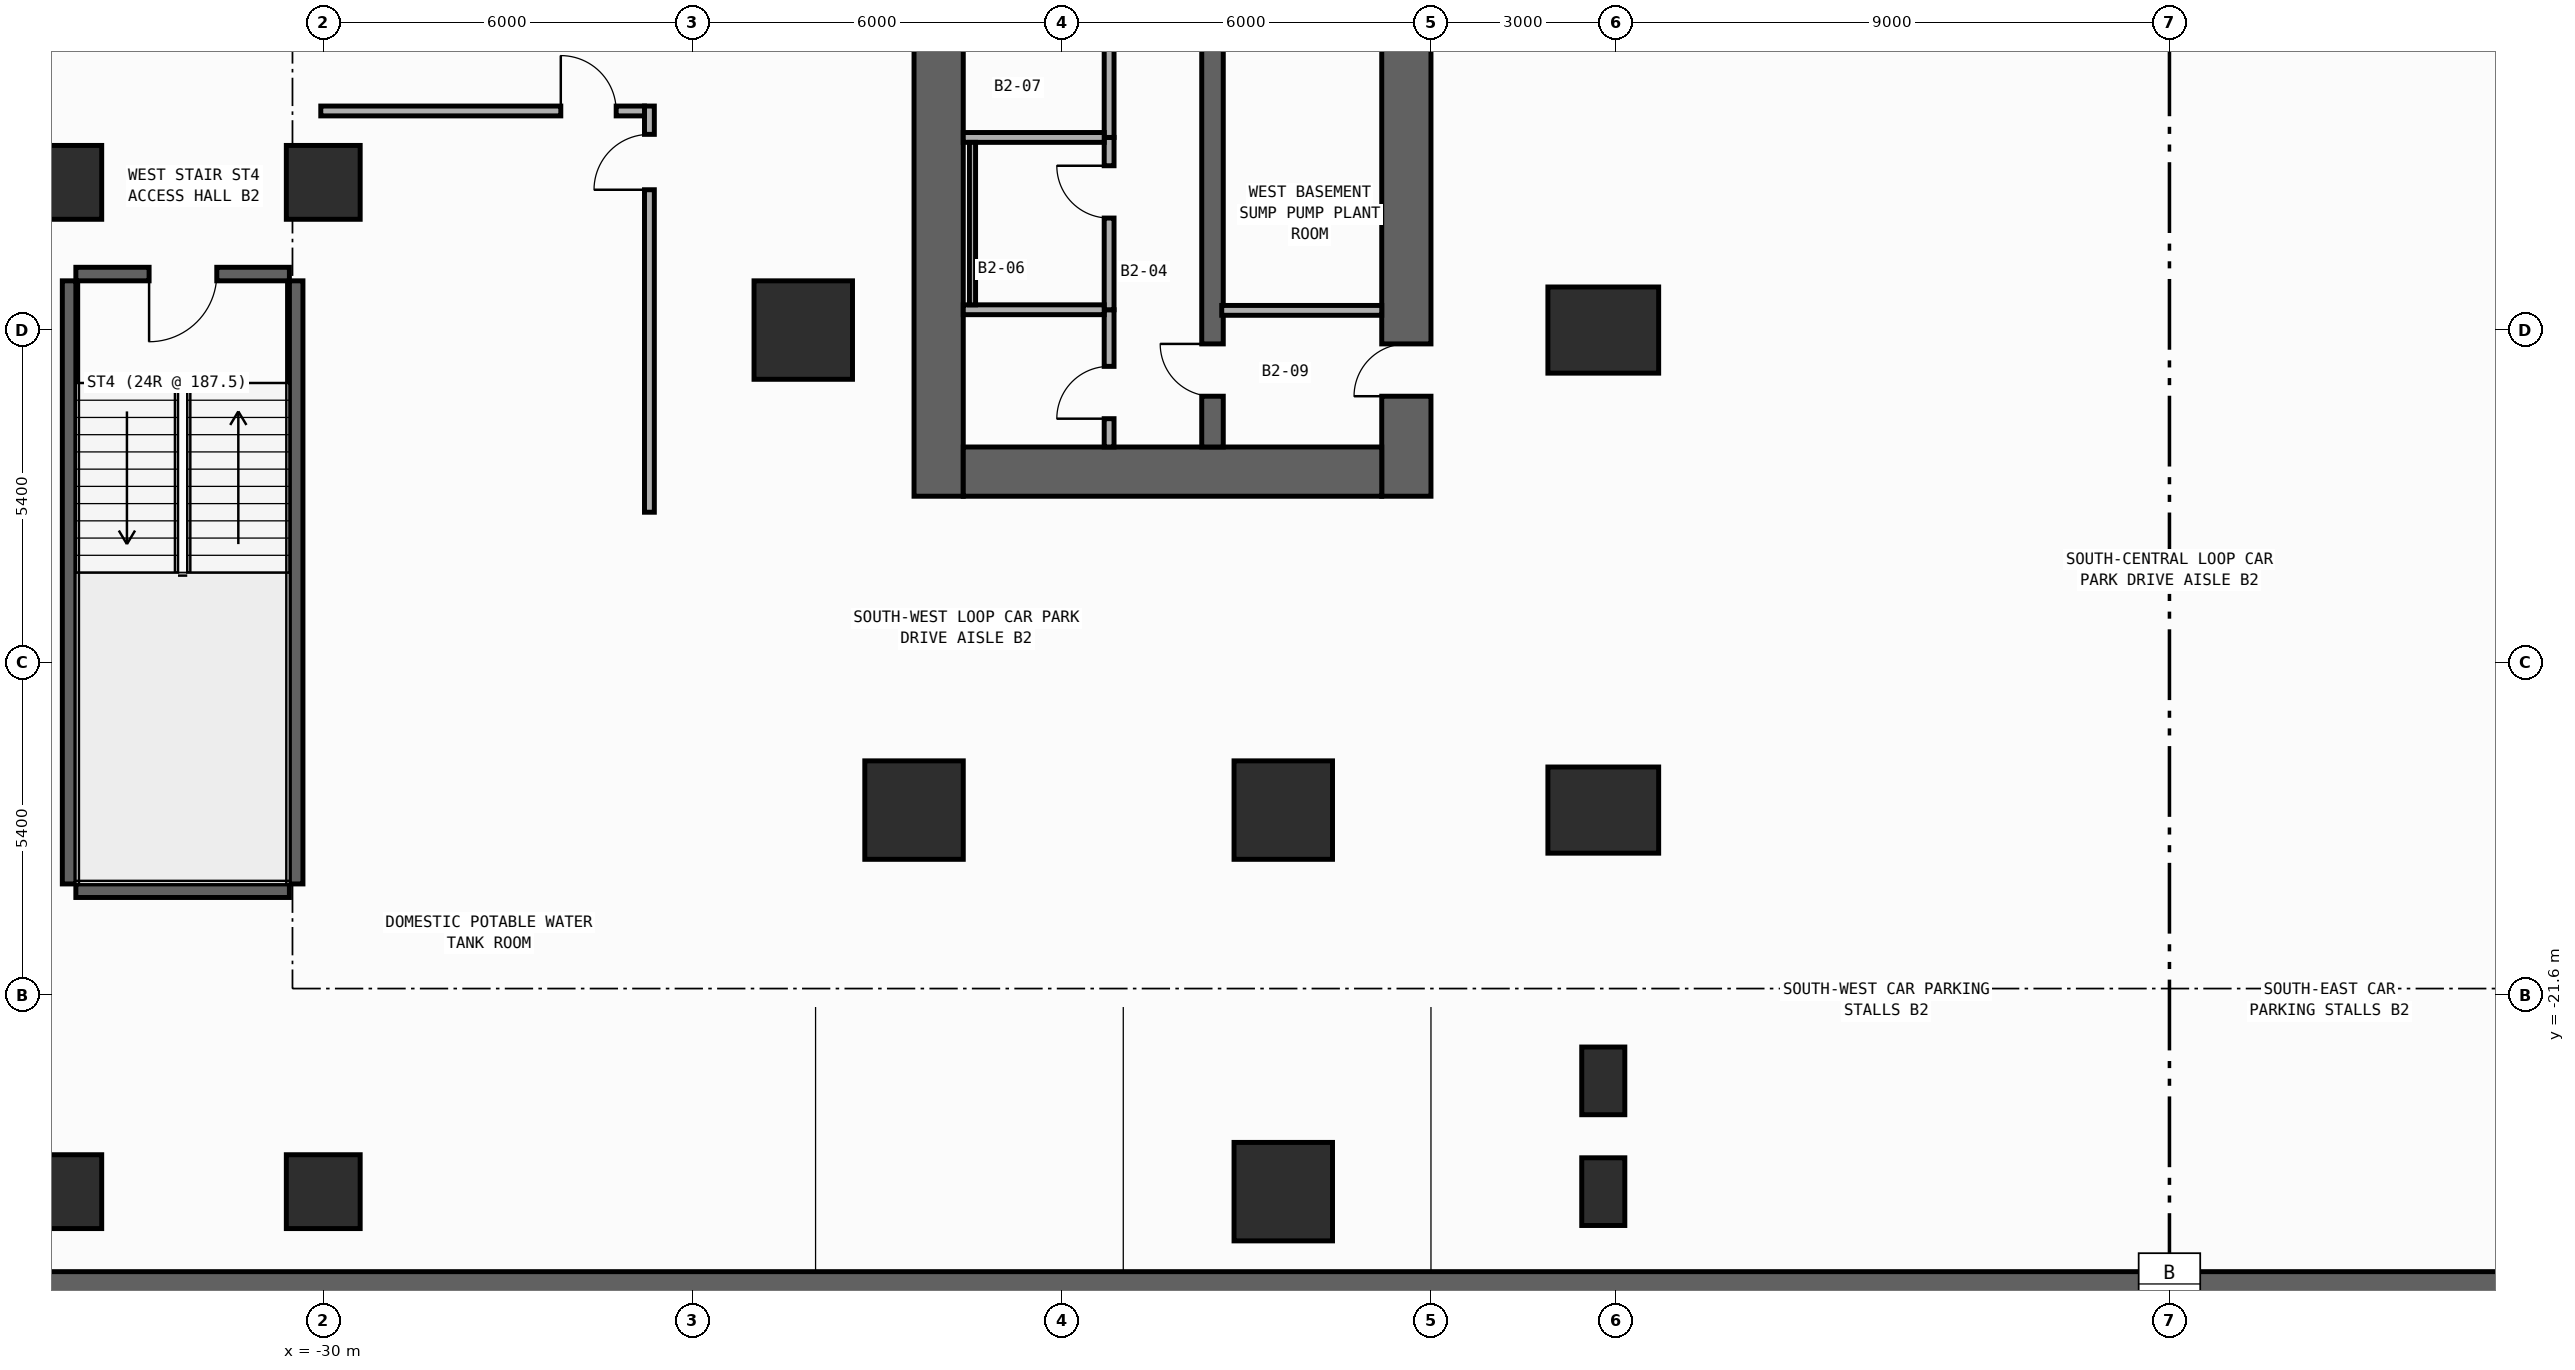
"""IFC4 building model, lengths in metres.
Left out: names, types, materials, properties, quantities, classifications, styles, units other than length and angle.
Written with IfcOpenShell. Run it as: python <this file> out.ifc"""

import sys

from ifc_helpers import new_model, si_unit, direction, frame, frame_2d, origin, origin_2d, place, context, subcontext, project, spatial, rectangle, extrude, element, fill, save


model = new_model("IFC4")
c1 = context("Model", 3, precision=1e-05, world=origin(), true_north=direction((0.0, 1.0)))
c2 = subcontext(c1, "Body", "Model", "MODEL_VIEW")
j1 = project(units=[si_unit("LENGTHUNIT", "METRE"), si_unit("PLANEANGLEUNIT", "RADIAN")], contexts=[c1])
p1 = place(None, origin())
s1 = spatial("IfcSite", under=j1, at=p1, CompositionType="ELEMENT")
p2 = place(p1, origin())
s2 = spatial("IfcBuilding", under=s1, at=p2, CompositionType="ELEMENT")
p3 = place(p2, frame((0.0, 0.0, -9.0)))
s3 = spatial("IfcBuildingStorey", under=s2, at=p3, CompositionType="ELEMENT", Elevation=-9.0)
p4 = place(p3, frame((-20.0, -13.5, 0.0), z_axis=(0.0, 0.0, 1.0), x_axis=(0.0, 1.0, 0.0)))
e1 = element("IfcWall", 1, at=p4, inside=s3, PredefinedType="SHEAR", context=c2, shape_type="SweptSolid", body=[
    extrude(rectangle(XDim=27.0, YDim=0.8, at=frame_2d((13.5, 0.0))), origin(), (0.0, 0.0, 1.0), 4.2),
])
p5 = place(p3, frame((-12.4, -13.5, 0.0), z_axis=(0.0, 0.0, 1.0), x_axis=(0.0, 1.0, 0.0)))
e2 = element("IfcWall", 2, at=p5, inside=s3, PredefinedType="SHEAR", context=c2, shape_type="SweptSolid", body=[
    extrude(rectangle(XDim=27.0, YDim=0.8, at=frame_2d((13.5, 0.0))), origin(), (0.0, 0.0, 1.0), 4.2),
])
p6 = place(p5, frame((17.575, 0.0, 0.0)))
e3 = element("IfcOpeningElement", 3, at=p6, cuts=e2, PredefinedType="OPENING", context=c2, shape_type="SweptSolid", body=[
    extrude(rectangle(XDim=0.85, YDim=2.1, at=frame_2d((0.425, 1.05))), frame((0.0, 0.41, 0.0), z_axis=(0.0, -1.0, 0.0), x_axis=(1.0, 0.0, 0.0)), (0.0, 0.0, 1.0), 0.82),
])
p7 = place(p5, frame((7.575, 0.0, 0.0)))
e4 = element("IfcOpeningElement", 4, at=p7, cuts=e2, PredefinedType="OPENING", context=c2, shape_type="SweptSolid", body=[
    extrude(rectangle(XDim=0.85, YDim=2.1, at=frame_2d((0.425, 1.05))), frame((0.0, 0.41, 0.0), z_axis=(0.0, -1.0, 0.0), x_axis=(1.0, 0.0, 0.0)), (0.0, 0.0, 1.0), 0.82),
])
p8 = place(p5, frame((12.725, 0.0, 0.0)))
e5 = element("IfcOpeningElement", 5, at=p8, cuts=e2, PredefinedType="OPENING", context=c2, shape_type="SweptSolid", body=[
    extrude(rectangle(XDim=1.15, YDim=2.2, at=frame_2d((0.575, 1.1))), frame((0.0, 0.41, 0.0), z_axis=(0.0, -1.0, 0.0), x_axis=(1.0, 0.0, 0.0)), (0.0, 0.0, 1.0), 0.82),
])
p9 = place(p5, frame((1.625, 0.0, 0.0)))
e6 = element("IfcOpeningElement", 6, at=p9, cuts=e2, PredefinedType="OPENING", context=c2, shape_type="SweptSolid", body=[
    extrude(rectangle(XDim=0.85, YDim=2.1, at=frame_2d((0.425, 1.05))), frame((0.0, 0.41, 0.0), z_axis=(0.0, -1.0, 0.0), x_axis=(1.0, 0.0, 0.0)), (0.0, 0.0, 1.0), 0.82),
])
p10 = place(p3, frame((-19.6, -13.1, 0.0), z_axis=(0.0, 0.0, 1.0), x_axis=(1.0, 0.0, 0.0)))
e7 = element("IfcWall", 7, at=p10, inside=s3, PredefinedType="SHEAR", context=c2, shape_type="SweptSolid", body=[
    extrude(rectangle(XDim=6.8, YDim=0.8, at=frame_2d((3.4, 0.0))), origin(), (0.0, 0.0, 1.0), 4.2),
])
p11 = place(p3, frame((-15.55, -12.7, 0.0), z_axis=(0.0, 0.0, 1.0), x_axis=(0.0, 1.0, 0.0)))
e8 = element("IfcWall", 8, at=p11, inside=s3, PredefinedType="SHEAR", context=c2, shape_type="SweptSolid", body=[
    extrude(rectangle(XDim=25.4, YDim=0.35, at=frame_2d((12.7, 0.0))), origin(), (0.0, 0.0, 1.0), 4.2),
])
p12 = place(p11, frame((11.925, 0.0, 0.0)))
e9 = element("IfcOpeningElement", 9, at=p12, cuts=e8, PredefinedType="OPENING", context=c2, shape_type="SweptSolid", body=[
    extrude(rectangle(XDim=1.15, YDim=2.2, at=frame_2d((0.575, 1.1))), frame((0.0, 0.185, 0.0), z_axis=(0.0, -1.0, 0.0), x_axis=(1.0, 0.0, 0.0)), (0.0, 0.0, 1.0), 0.37),
])
p13 = place(p11, frame((0.825, 0.0, 0.0)))
e10 = element("IfcOpeningElement", 10, at=p13, cuts=e8, PredefinedType="OPENING", context=c2, shape_type="SweptSolid", body=[
    extrude(rectangle(XDim=0.85, YDim=2.1, at=frame_2d((0.425, 1.05))), frame((0.0, 0.185, 0.0), z_axis=(0.0, -1.0, 0.0), x_axis=(1.0, 0.0, 0.0)), (0.0, 0.0, 1.0), 0.37),
])
p14 = place(p3, frame((-30.55, -9.89, 0.0), z_axis=(0.0, 0.0, 1.0), x_axis=(-1.0, 0.0, 0.0)))
e11 = element("IfcWall", 11, at=p14, inside=s3, PredefinedType="SHEAR", context=c2, shape_type="SweptSolid", body=[
    extrude(rectangle(XDim=3.47, YDim=0.22, at=frame_2d((1.735, 0.0))), origin(), (0.0, 0.0, 1.0), 4.2),
])
p15 = place(p14, frame((1.18, 0.0, 0.0)))
e12 = element("IfcOpeningElement", 12, at=p15, cuts=e11, PredefinedType="OPENING", context=c2, shape_type="SweptSolid", body=[
    extrude(rectangle(XDim=1.1, YDim=2.2, at=frame_2d((0.55, 1.1))), frame((0.0, 0.12, 0.0), z_axis=(0.0, -1.0, 0.0), x_axis=(1.0, 0.0, 0.0)), (0.0, 0.0, 1.0), 0.24),
])
p16 = place(p3, frame((-34.02, -19.91, 0.0), z_axis=(0.0, 0.0, 1.0), x_axis=(1.0, 0.0, 0.0)))
e13 = element("IfcWall", 13, at=p16, inside=s3, PredefinedType="SHEAR", context=c2, shape_type="SweptSolid", body=[
    extrude(rectangle(XDim=3.47, YDim=0.22, at=frame_2d((1.735, 0.0))), origin(), (0.0, 0.0, 1.0), 4.2),
])
for number, where, z_axis, x_axis in (
    (14, (-34.13, -19.8, 0.0), (0.0, 0.0, 1.0), (0.0, 1.0, 0.0)),
    (15, (-30.44, -19.8, 0.0), (0.0, 0.0, 1.0), (0.0, 1.0, 0.0)),
):
    element("IfcWall", number, at=place(p3, frame(where, z_axis=z_axis, x_axis=x_axis)), inside=s3, PredefinedType="SHEAR", context=c2, shape_type="SweptSolid", body=[
        extrude(rectangle(XDim=9.8, YDim=0.22, at=frame_2d((4.9, 0.0))), origin(), (0.0, 0.0, 1.0), 4.2),
    ])
p17 = place(p3, frame((-35.1, -26.55, 0.0), z_axis=(0.0, 0.0, 1.0), x_axis=(1.0, 0.0, 0.0)))
e16 = element("IfcWall", 16, at=p17, inside=s3, PredefinedType="SHEAR", context=c2, shape_type="SweptSolid", body=[
    extrude(rectangle(XDim=70.2, YDim=0.9, at=frame_2d((35.1, 0.0))), origin(), (0.0, 0.0, 1.0), 4.2),
])
for number, where, z_axis, x_axis in (
    (17, (-9.2, -18.6, 0.0), (0.0, 0.0, 1.0), (1.0, 0.0, 0.0)),
    (18, (-9.2, -10.8, 0.0), (0.0, 0.0, 1.0), (1.0, 0.0, 0.0)),
):
    element("IfcColumn", number, at=place(p3, frame(where, z_axis=z_axis, x_axis=x_axis)), inside=s3, PredefinedType="COLUMN", context=c2, shape_type="SweptSolid", body=[
        extrude(rectangle(XDim=1.8, YDim=1.4, at=origin_2d()), origin(), (0.0, 0.0, 1.0), 4.5),
    ])
for number, where, z_axis, x_axis in (
    (19, (-20.4, -18.6, 0.0), (0.0, 0.0, 1.0), (1.0, 0.0, 0.0)),
    (20, (-14.4, -18.6, 0.0), (0.0, 0.0, 1.0), (1.0, 0.0, 0.0)),
):
    element("IfcColumn", number, at=place(p3, frame(where, z_axis=z_axis, x_axis=x_axis)), inside=s3, PredefinedType="COLUMN", context=c2, shape_type="SweptSolid", body=[
        extrude(rectangle(XDim=1.6, YDim=1.6, at=origin_2d()), origin(), (0.0, 0.0, 1.0), 4.5),
    ])
for number, where, z_axis, x_axis in (
    (21, (-34.2, -24.8, 0.0), (0.0, 0.0, 1.0), (1.0, 0.0, 0.0)),
    (22, (-34.2, -8.4, 0.0), (0.0, 0.0, 1.0), (1.0, 0.0, 0.0)),
    (23, (-30.0, -24.8, 0.0), (0.0, 0.0, 1.0), (1.0, 0.0, 0.0)),
    (24, (-30.0, -8.4, 0.0), (0.0, 0.0, 1.0), (1.0, 0.0, 0.0)),
):
    element("IfcColumn", number, at=place(p3, frame(where, z_axis=z_axis, x_axis=x_axis)), inside=s3, PredefinedType="COLUMN", context=c2, shape_type="SweptSolid", body=[
        extrude(rectangle(XDim=1.2, YDim=1.2, at=origin_2d()), origin(), (0.0, 0.0, 1.0), 4.5),
    ])
p18 = place(p3, frame((-9.2, -24.8, 0.0), z_axis=(0.0, 0.0, 1.0), x_axis=(1.0, 0.0, 0.0)))
e25 = element("IfcColumn", 25, at=p18, inside=s3, PredefinedType="PILASTER", context=c2, shape_type="SweptSolid", body=[
    extrude(rectangle(XDim=0.7, YDim=1.1, at=origin_2d()), origin(), (0.0, 0.0, 1.0), 4.5),
])
for number, where, z_axis, x_axis in (
    (26, (-22.2, -10.8, 0.0), (0.0, 0.0, 1.0), (1.0, 0.0, 0.0)),
    (27, (-14.4, -24.8, 0.0), (0.0, 0.0, 1.0), (1.0, 0.0, 0.0)),
):
    element("IfcColumn", number, at=place(p3, frame(where, z_axis=z_axis, x_axis=x_axis)), inside=s3, PredefinedType="COLUMN", context=c2, shape_type="SweptSolid", body=[
        extrude(rectangle(XDim=1.6, YDim=1.6, at=origin_2d()), origin(), (0.0, 0.0, 1.0), 4.5),
    ])
p19 = place(p3, frame((-9.2, -23.0, 0.0), z_axis=(0.0, 0.0, 1.0), x_axis=(1.0, 0.0, 0.0)))
e28 = element("IfcColumn", 28, at=p19, inside=s3, PredefinedType="PILASTER", context=c2, shape_type="SweptSolid", body=[
    extrude(rectangle(XDim=0.7, YDim=1.1, at=origin_2d()), origin(), (0.0, 0.0, 1.0), 4.5),
])
p20 = place(p3, frame((-15.4, -10.48, 0.0), z_axis=(0.0, 0.0, 1.0), x_axis=(1.0, 0.0, 0.0)))
e29 = element("IfcWall", 29, at=p20, inside=s3, PredefinedType="STANDARD", context=c2, shape_type="SweptSolid", body=[
    extrude(rectangle(XDim=2.6, YDim=0.16, at=frame_2d((1.3, 0.0))), origin(), (0.0, 0.0, 1.0), 4.2),
])
p21 = place(p3, frame((-17.23, -12.7, 0.0), z_axis=(0.0, 0.0, 1.0), x_axis=(0.0, 1.0, 0.0)))
e30 = element("IfcWall", 30, at=p21, inside=s3, PredefinedType="PARTITIONING", context=c2, shape_type="SweptSolid", body=[
    extrude(rectangle(XDim=2.23, YDim=0.16, at=frame_2d((1.115, 0.0))), origin(), (0.0, 0.0, 1.0), 4.2),
])
p22 = place(p21, frame((0.46, 0.0, 0.0)))
e31 = element("IfcOpeningElement", 31, at=p22, cuts=e30, PredefinedType="OPENING", context=c2, shape_type="SweptSolid", body=[
    extrude(rectangle(XDim=0.85, YDim=2.1, at=frame_2d((0.425, 1.05))), frame((0.0, 0.09, 0.0), z_axis=(0.0, -1.0, 0.0), x_axis=(1.0, 0.0, 0.0)), (0.0, 0.0, 1.0), 0.18),
])
p23 = place(p3, frame((-17.23, -10.47, 0.0), z_axis=(0.0, 0.0, 1.0), x_axis=(0.0, 1.0, 0.0)))
e32 = element("IfcWall", 32, at=p23, inside=s3, PredefinedType="PARTITIONING", context=c2, shape_type="SweptSolid", body=[
    extrude(rectangle(XDim=2.8, YDim=0.16, at=frame_2d((1.4, 0.0))), origin(), (0.0, 0.0, 1.0), 4.2),
])
p24 = place(p23, frame((1.49, 0.0, 0.0)))
e33 = element("IfcOpeningElement", 33, at=p24, cuts=e32, PredefinedType="OPENING", context=c2, shape_type="SweptSolid", body=[
    extrude(rectangle(XDim=0.85, YDim=2.1, at=frame_2d((0.425, 1.05))), frame((0.0, 0.09, 0.0), z_axis=(0.0, -1.0, 0.0), x_axis=(1.0, 0.0, 0.0)), (0.0, 0.0, 1.0), 0.18),
])
p25 = place(p3, frame((-17.23, -7.67, 0.0), z_axis=(0.0, 0.0, 1.0), x_axis=(0.0, 1.0, 0.0)))
e34 = element("IfcWall", 34, at=p25, inside=s3, PredefinedType="PARTITIONING", context=c2, shape_type="SweptSolid", body=[
    extrude(rectangle(XDim=2.86, YDim=0.16, at=frame_2d((1.43, 0.0))), origin(), (0.0, 0.0, 1.0), 4.2),
])
p26 = place(p25, frame((1.55, 0.0, 0.0)))
e35 = element("IfcOpeningElement", 35, at=p26, cuts=e34, PredefinedType="OPENING", context=c2, shape_type="SweptSolid", body=[
    extrude(rectangle(XDim=0.85, YDim=2.1, at=frame_2d((0.425, 1.05))), frame((0.0, 0.09, 0.0), z_axis=(0.0, -1.0, 0.0), x_axis=(1.0, 0.0, 0.0)), (0.0, 0.0, 1.0), 0.18),
])
for number, where, z_axis, x_axis in (
    (36, (-19.6, -10.47, 0.0), (0.0, 0.0, 1.0), (1.0, 0.0, 0.0)),
    (37, (-19.6, -7.67, 0.0), (0.0, 0.0, 1.0), (1.0, 0.0, 0.0)),
):
    element("IfcWall", number, at=place(p3, frame(where, z_axis=z_axis, x_axis=x_axis)), inside=s3, PredefinedType="PARTITIONING", context=c2, shape_type="SweptSolid", body=[
        extrude(rectangle(XDim=2.29, YDim=0.16, at=frame_2d((1.145, 0.0))), origin(), (0.0, 0.0, 1.0), 4.2),
    ])
p27 = place(p3, frame((-24.7, -13.76, 0.0), z_axis=(0.0, 0.0, 1.0), x_axis=(0.0, 1.0, 0.0)))
e38 = element("IfcWall", 38, at=p27, inside=s3, PredefinedType="PARTITIONING", context=c2, shape_type="SweptSolid", body=[
    extrude(rectangle(XDim=6.6, YDim=0.16, at=frame_2d((3.3, 0.0))), origin(), (0.0, 0.0, 1.0), 4.2),
])
p28 = place(p27, frame((5.24, 0.0, 0.0)))
e39 = element("IfcOpeningElement", 39, at=p28, cuts=e38, PredefinedType="OPENING", context=c2, shape_type="SweptSolid", body=[
    extrude(rectangle(XDim=0.9, YDim=2.15, at=frame_2d((0.45, 1.075))), frame((0.0, 0.09, 0.0), z_axis=(0.0, -1.0, 0.0), x_axis=(1.0, 0.0, 0.0)), (0.0, 0.0, 1.0), 0.18),
])
p29 = place(p3, frame((-30.04, -7.24, 0.0), z_axis=(0.0, 0.0, 1.0), x_axis=(1.0, 0.0, 0.0)))
e40 = element("IfcWall", 40, at=p29, inside=s3, PredefinedType="PARTITIONING", context=c2, shape_type="SweptSolid", body=[
    extrude(rectangle(XDim=5.26, YDim=0.16, at=frame_2d((2.63, 0.0))), origin(), (0.0, 0.0, 1.0), 4.2),
])
p30 = place(p29, frame((3.9, 0.0, 0.0)))
e41 = element("IfcOpeningElement", 41, at=p30, cuts=e40, PredefinedType="OPENING", context=c2, shape_type="SweptSolid", body=[
    extrude(rectangle(XDim=0.9, YDim=2.15, at=frame_2d((0.45, 1.075))), frame((0.0, 0.09, 0.0), z_axis=(0.0, -1.0, 0.0), x_axis=(1.0, 0.0, 0.0)), (0.0, 0.0, 1.0), 0.18),
])
p31 = place(p3, frame((-19.45, -10.39, 0.0), z_axis=(0.0, 0.0, 1.0), x_axis=(0.0, 1.0, 0.0)))
e42 = element("IfcWall", 42, at=p31, inside=s3, PredefinedType="PARTITIONING", context=c2, shape_type="SweptSolid", body=[
    extrude(rectangle(XDim=2.64, YDim=0.1, at=frame_2d((1.32, 0.0))), origin(), (0.0, 0.0, 1.0), 4.2),
])
p32 = place(p15, origin())
e43 = element("IfcDoor", 43, at=p32, inside=s3, OperationType="SINGLE_SWING_RIGHT", PredefinedType="DOOR", context=c2, shape_type="SweptSolid", body=[
    extrude(rectangle(XDim=1.1, YDim=2.2, at=frame_2d((0.55, 1.1))), frame((0.0, 0.025, 0.0), z_axis=(0.0, -1.0, 0.0), x_axis=(1.0, 0.0, 0.0)), (0.0, 0.0, 1.0), 0.05),
])
fill(e12, e43)
p33 = place(p9, origin())
e44 = element("IfcDoor", 44, at=p33, inside=s3, OperationType="SINGLE_SWING_LEFT", PredefinedType="DOOR", context=c2, shape_type="SweptSolid", body=[
    extrude(rectangle(XDim=0.85, YDim=2.1, at=frame_2d((0.425, 1.05))), frame((0.0, 0.025, 0.0), z_axis=(0.0, -1.0, 0.0), x_axis=(1.0, 0.0, 0.0)), (0.0, 0.0, 1.0), 0.05),
])
fill(e6, e44)
p34 = place(p13, origin())
e45 = element("IfcDoor", 45, at=p34, inside=s3, OperationType="SINGLE_SWING_RIGHT", PredefinedType="DOOR", context=c2, shape_type="SweptSolid", body=[
    extrude(rectangle(XDim=0.85, YDim=2.1, at=frame_2d((0.425, 1.05))), frame((0.0, 0.025, 0.0), z_axis=(0.0, -1.0, 0.0), x_axis=(1.0, 0.0, 0.0)), (0.0, 0.0, 1.0), 0.05),
])
fill(e10, e45)
p35 = place(p22, origin())
e46 = element("IfcDoor", 46, at=p35, inside=s3, OperationType="SINGLE_SWING_LEFT", PredefinedType="DOOR", context=c2, shape_type="SweptSolid", body=[
    extrude(rectangle(XDim=0.85, YDim=2.1, at=frame_2d((0.425, 1.05))), frame((0.0, 0.025, 0.0), z_axis=(0.0, -1.0, 0.0), x_axis=(1.0, 0.0, 0.0)), (0.0, 0.0, 1.0), 0.05),
])
fill(e31, e46)
p36 = place(p24, origin())
e47 = element("IfcDoor", 47, at=p36, inside=s3, OperationType="SINGLE_SWING_RIGHT", PredefinedType="DOOR", context=c2, shape_type="SweptSolid", body=[
    extrude(rectangle(XDim=0.85, YDim=2.1, at=frame_2d((0.425, 1.05))), frame((0.0, 0.025, 0.0), z_axis=(0.0, -1.0, 0.0), x_axis=(1.0, 0.0, 0.0)), (0.0, 0.0, 1.0), 0.05),
])
fill(e33, e47)
p37 = place(p28, origin())
e48 = element("IfcDoor", 48, at=p37, inside=s3, OperationType="SINGLE_SWING_LEFT", PredefinedType="DOOR", context=c2, shape_type="SweptSolid", body=[
    extrude(rectangle(XDim=0.9, YDim=2.15, at=frame_2d((0.45, 1.075))), frame((0.0, 0.025, 0.0), z_axis=(0.0, -1.0, 0.0), x_axis=(1.0, 0.0, 0.0)), (0.0, 0.0, 1.0), 0.05),
])
fill(e39, e48)
p38 = place(p30, origin())
e49 = element("IfcDoor", 49, at=p38, inside=s3, OperationType="SINGLE_SWING_LEFT", PredefinedType="DOOR", context=c2, shape_type="SweptSolid", body=[
    extrude(rectangle(XDim=0.9, YDim=2.15, at=frame_2d((0.45, 1.075))), frame((0.0, 0.025, 0.0), z_axis=(0.0, -1.0, 0.0), x_axis=(1.0, 0.0, 0.0)), (0.0, 0.0, 1.0), 0.05),
])
fill(e41, e49)
save(model, sys.argv[1])
